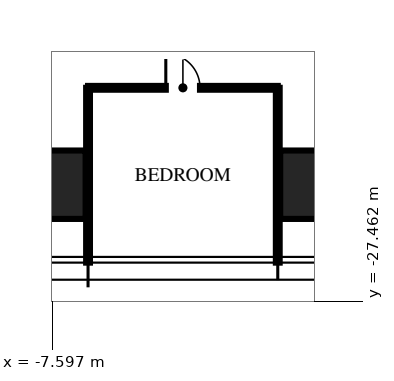
"""IFC4 building model, lengths in metres.
Left out: names, types, materials, properties, quantities, classifications, styles, units other than length and angle.
Written with IfcOpenShell. Run it as: python <this file> out.ifc"""

import sys

from ifc_helpers import new_model, si_unit, direction, frame, frame_2d, origin, origin_2d, place, context, subcontext, project, spatial, rectangle, hollow_rectangle, extrude, element, fill, save


model = new_model("IFC4")
c1 = context("Model", 3, precision=1e-05, world=origin(), true_north=direction((0.0, 1.0)))
c2 = subcontext(c1, "Body", "Model", "MODEL_VIEW")
j1 = project(units=[si_unit("LENGTHUNIT", "METRE"), si_unit("PLANEANGLEUNIT", "RADIAN")], contexts=[c1])
p1 = place(None, origin())
s1 = spatial("IfcSite", under=j1, at=p1, CompositionType="ELEMENT")
p2 = place(p1, origin())
s2 = spatial("IfcBuilding", under=s1, at=p2, CompositionType="ELEMENT")
p3 = place(p2, frame((0.0, 0.0, 203.25)))
s3 = spatial("IfcBuildingStorey", under=s2, at=p3, CompositionType="ELEMENT", Elevation=203.25)
for number, where, z_axis, x_axis in (
    (1, (0.0, -24.4, 0.0), (0.0, 0.0, 1.0), (1.0, 0.0, 0.0)),
    (2, (-8.32, -24.4, 0.0), (0.0, 0.0, 1.0), (1.0, 0.0, 0.0)),
):
    element("IfcColumn", number, at=place(p3, frame(where, z_axis=z_axis, x_axis=x_axis)), inside=s3, PredefinedType="COLUMN", context=c2, shape_type="SweptSolid", body=[
        extrude(hollow_rectangle(XDim=3.2, YDim=1.8, WallThickness=0.2, at=origin_2d()), origin(), (0.0, 0.0, 1.0), 3.75),
    ])
for number, where, z_axis, x_axis in (
    (3, (-6.656, -21.85, 0.0), (0.0, 0.0, 1.0), (0.0, -1.0, 0.0)),
    (4, (-1.664, -21.85, 0.0), (0.0, 0.0, 1.0), (0.0, -1.0, 0.0)),
):
    element("IfcWall", number, at=place(p3, frame(where, z_axis=z_axis, x_axis=x_axis)), inside=s3, PredefinedType="PARTITIONING", context=c2, shape_type="SweptSolid", body=[
        extrude(rectangle(XDim=4.6, YDim=0.1, at=frame_2d((2.3, 0.0))), origin(), (0.0, 0.0, 1.0), 2.91),
    ])
p4 = place(p3, frame((-6.656, -21.85, 0.0), z_axis=(0.0, 0.0, 1.0), x_axis=(1.0, 0.0, 0.0)))
e5 = element("IfcWall", 5, at=p4, inside=s3, PredefinedType="PARTITIONING", context=c2, shape_type="SweptSolid", body=[
    extrude(rectangle(XDim=4.992, YDim=0.1, at=frame_2d((2.496, 0.0))), origin(), (0.0, 0.0, 1.0), 2.81),
])
p5 = place(p4, frame((2.046, 0.0, 0.0)))
e6 = element("IfcOpeningElement", 6, at=p5, cuts=e5, PredefinedType="OPENING", context=c2, shape_type="SweptSolid", body=[
    extrude(rectangle(XDim=0.9, YDim=2.1, at=frame_2d((0.45, 1.05))), frame((0.0, 0.06, 0.0), z_axis=(0.0, -1.0, 0.0), x_axis=(1.0, 0.0, 0.0)), (0.0, 0.0, 1.0), 0.12),
])
p6 = place(p5, origin())
e7 = element("IfcDoor", 7, at=p6, inside=s3, OperationType="SINGLE_SWING_LEFT", PredefinedType="DOOR", context=c2, shape_type="SweptSolid", body=[
    extrude(rectangle(XDim=0.9, YDim=2.1, at=frame_2d((0.45, 1.05))), frame((0.0, 0.025, 0.0), z_axis=(0.0, -1.0, 0.0), x_axis=(1.0, 0.0, 0.0)), (0.0, 0.0, 1.0), 0.05),
])
fill(e6, e7)
save(model, sys.argv[1])
